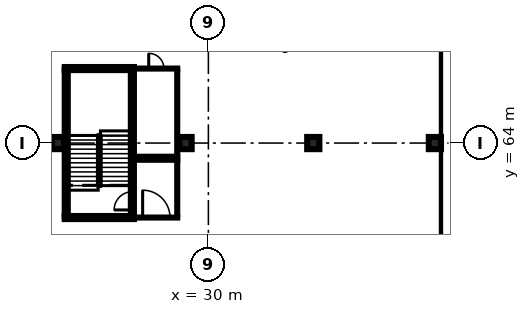
"""IFC4 building model, lengths in metres.
Left out: names, types, materials, properties, quantities, classifications, styles, units other than length and angle.
Written with IfcOpenShell. Run it as: python <this file> out.ifc"""

import sys

from ifc_helpers import new_model, si_unit, direction, frame, frame_2d, origin, origin_2d, place, context, subcontext, project, spatial, rectangle, extrude, element, fill, save


model = new_model("IFC4")
c1 = context("Model", 3, precision=1e-05, world=origin(), true_north=direction((0.0, 1.0)))
c2 = subcontext(c1, "Body", "Model", "MODEL_VIEW")
j1 = project(units=[si_unit("LENGTHUNIT", "METRE"), si_unit("PLANEANGLEUNIT", "RADIAN")], contexts=[c1])
p1 = place(None, origin())
s1 = spatial("IfcSite", under=j1, at=p1, CompositionType="ELEMENT")
p2 = place(p1, origin())
s2 = spatial("IfcBuilding", under=s1, at=p2, CompositionType="ELEMENT")
p3 = place(p2, frame((0.0, 0.0, -12.0)))
s3 = spatial("IfcBuildingStorey", under=s2, at=p3, CompositionType="ELEMENT", Elevation=-12.0)
p4 = place(p3, frame((45.75, -80.0, 0.0), z_axis=(0.0, 0.0, 1.0), x_axis=(0.0, 1.0, 0.0)))
e1 = element("IfcWall", 1, at=p4, inside=s3, PredefinedType="USERDEFINED", context=c2, shape_type="SweptSolid", body=[
    extrude(rectangle(XDim=160.0, YDim=0.9, at=frame_2d((80.0, 0.0))), origin(), (0.0, 0.0, 1.0), 11.55),
])
p5 = place(p2, frame((0.0, 0.0, -7.2)))
s4 = spatial("IfcBuildingStorey", under=s2, at=p5, CompositionType="ELEMENT", Elevation=-7.2)
for number, where, z_axis, x_axis in (
    (2, (20.1, 64.0, -0.4), (0.0, 0.0, 1.0), (1.0, 0.0, 0.0)),
    (3, (28.5, 64.0, -0.4), (0.0, 0.0, 1.0), (1.0, 0.0, 0.0)),
    (4, (36.9, 64.0, -0.4), (0.0, 0.0, 1.0), (1.0, 0.0, 0.0)),
    (5, (44.9, 64.0, -0.4), (0.0, 0.0, 1.0), (1.0, 0.0, 0.0)),
):
    element("IfcColumn", number, at=place(p5, frame(where, z_axis=z_axis, x_axis=x_axis)), inside=s4, PredefinedType="COLUMN", context=c2, shape_type="SweptSolid", body=[
        extrude(rectangle(XDim=0.8, YDim=0.8, at=origin_2d()), origin(), (0.0, 0.0, 1.0), 3.6),
    ])
p6 = place(p5, frame((25.1, 59.1, 0.0), z_axis=(0.0, 0.0, 1.0), x_axis=(1.0, 0.0, 0.0)))
e6 = element("IfcWall", 6, at=p6, inside=s4, PredefinedType="PARTITIONING", context=c2, shape_type="SweptSolid", body=[
    extrude(rectangle(XDim=2.95, YDim=0.2, at=frame_2d((1.475, 0.0))), origin(), (0.0, 0.0, 1.0), 3.2),
])
p7 = place(p6, frame((0.575, 0.0, 0.0)))
e7 = element("IfcOpeningElement", 7, at=p7, cuts=e6, PredefinedType="OPENING", context=c2, shape_type="SweptSolid", body=[
    extrude(rectangle(XDim=1.8, YDim=2.1, at=frame_2d((0.9, 1.05))), frame((0.0, 0.11, 0.0), z_axis=(0.0, -1.0, 0.0), x_axis=(1.0, 0.0, 0.0)), (0.0, 0.0, 1.0), 0.22),
])
p8 = place(p5, frame((25.1, 62.9, 0.0), z_axis=(0.0, 0.0, 1.0), x_axis=(1.0, 0.0, 0.0)))
e8 = element("IfcWall", 8, at=p8, inside=s4, PredefinedType="PARTITIONING", context=c2, shape_type="SweptSolid", body=[
    extrude(rectangle(XDim=2.95, YDim=0.2, at=frame_2d((1.475, 0.0))), origin(), (0.0, 0.0, 1.0), 3.2),
])
p9 = place(p5, frame((27.95, 59.2, 0.0), z_axis=(0.0, 0.0, 1.0), x_axis=(0.0, 1.0, 0.0)))
e9 = element("IfcWall", 9, at=p9, inside=s4, PredefinedType="PARTITIONING", context=c2, shape_type="SweptSolid", body=[
    extrude(rectangle(XDim=3.6, YDim=0.2, at=frame_2d((1.8, 0.0))), origin(), (0.0, 0.0, 1.0), 3.2),
])
p10 = place(p5, frame((25.1, 63.1, 0.0), z_axis=(0.0, 0.0, 1.0), x_axis=(1.0, 0.0, 0.0)))
e10 = element("IfcWall", 10, at=p10, inside=s4, PredefinedType="PARTITIONING", context=c2, shape_type="SweptSolid", body=[
    extrude(rectangle(XDim=2.95, YDim=0.2, at=frame_2d((1.475, 0.0))), origin(), (0.0, 0.0, 1.0), 3.2),
])
p11 = place(p5, frame((25.1, 68.9, 0.0), z_axis=(0.0, 0.0, 1.0), x_axis=(1.0, 0.0, 0.0)))
e11 = element("IfcWall", 11, at=p11, inside=s4, PredefinedType="PARTITIONING", context=c2, shape_type="SweptSolid", body=[
    extrude(rectangle(XDim=2.95, YDim=0.2, at=frame_2d((1.475, 0.0))), origin(), (0.0, 0.0, 1.0), 3.2),
])
p12 = place(p11, frame((0.975, 0.0, 0.0)))
e12 = element("IfcOpeningElement", 12, at=p12, cuts=e11, PredefinedType="OPENING", context=c2, shape_type="SweptSolid", body=[
    extrude(rectangle(XDim=1.0, YDim=2.1, at=frame_2d((0.5, 1.05))), frame((0.0, 0.11, 0.0), z_axis=(0.0, -1.0, 0.0), x_axis=(1.0, 0.0, 0.0)), (0.0, 0.0, 1.0), 0.22),
])
p13 = place(p5, frame((27.95, 63.2, 0.0), z_axis=(0.0, 0.0, 1.0), x_axis=(0.0, 1.0, 0.0)))
e13 = element("IfcWall", 13, at=p13, inside=s4, PredefinedType="PARTITIONING", context=c2, shape_type="SweptSolid", body=[
    extrude(rectangle(XDim=5.6, YDim=0.2, at=frame_2d((2.8, 0.0))), origin(), (0.0, 0.0, 1.0), 3.2),
])
p14 = place(p5, frame((20.65, 59.2, 0.0), z_axis=(0.0, 0.0, 1.0), x_axis=(0.0, 1.0, 0.0)))
e14 = element("IfcWall", 14, at=p14, inside=s4, PredefinedType="SOLIDWALL", context=c2, shape_type="SweptSolid", body=[
    extrude(rectangle(XDim=9.6, YDim=0.2, at=frame_2d((4.8, 0.0))), origin(), (0.0, 0.0, 1.0), 3.2),
])
p15 = place(p5, frame((25.0, 59.2, 0.0), z_axis=(0.0, 0.0, 1.0), x_axis=(0.0, 1.0, 0.0)))
e15 = element("IfcWall", 15, at=p15, inside=s4, PredefinedType="SOLIDWALL", context=c2, shape_type="SweptSolid", body=[
    extrude(rectangle(XDim=9.6, YDim=0.2, at=frame_2d((4.8, 0.0))), origin(), (0.0, 0.0, 1.0), 3.2),
])
p16 = place(p15, frame((0.4, 0.0, 0.0)))
e16 = element("IfcOpeningElement", 16, at=p16, cuts=e15, PredefinedType="OPENING", context=c2, shape_type="SweptSolid", body=[
    extrude(rectangle(XDim=1.2, YDim=2.1, at=frame_2d((0.6, 1.05))), frame((0.0, 0.11, 0.0), z_axis=(0.0, -1.0, 0.0), x_axis=(1.0, 0.0, 0.0)), (0.0, 0.0, 1.0), 0.22),
])
for number, where, z_axis, x_axis in (
    (17, (25.1, 59.1, 0.0), (0.0, 0.0, 1.0), (-1.0, 0.0, 0.0)),
    (18, (20.55, 68.9, 0.0), (0.0, 0.0, 1.0), (1.0, 0.0, 0.0)),
):
    element("IfcWall", number, at=place(p5, frame(where, z_axis=z_axis, x_axis=x_axis)), inside=s4, PredefinedType="SOLIDWALL", context=c2, shape_type="SweptSolid", body=[
        extrude(rectangle(XDim=4.55, YDim=0.2, at=frame_2d((2.275, 0.0))), origin(), (0.0, 0.0, 1.0), 3.2),
    ])
p17 = place(p7, origin())
e19 = element("IfcDoor", 19, at=p17, inside=s4, OperationType="DOUBLE_DOOR_SINGLE_SWING", PredefinedType="DOOR", context=c2, shape_type="SweptSolid", body=[
    extrude(rectangle(XDim=1.8, YDim=2.1, at=frame_2d((0.9, 1.05))), frame((0.0, 0.025, 0.0), z_axis=(0.0, -1.0, 0.0), x_axis=(1.0, 0.0, 0.0)), (0.0, 0.0, 1.0), 0.05),
])
fill(e7, e19)
p18 = place(p12, origin())
e20 = element("IfcDoor", 20, at=p18, inside=s4, OperationType="SINGLE_SWING_LEFT", PredefinedType="DOOR", context=c2, shape_type="SweptSolid", body=[
    extrude(rectangle(XDim=1.0, YDim=2.1, at=frame_2d((0.5, 1.05))), frame((0.0, 0.025, 0.0), z_axis=(0.0, -1.0, 0.0), x_axis=(1.0, 0.0, 0.0)), (0.0, 0.0, 1.0), 0.05),
])
fill(e12, e20)
p19 = place(p16, origin())
e21 = element("IfcDoor", 21, at=p19, inside=s4, OperationType="SINGLE_SWING_LEFT", PredefinedType="DOOR", context=c2, shape_type="SweptSolid", body=[
    extrude(rectangle(XDim=1.2, YDim=2.1, at=frame_2d((0.6, 1.05))), frame((0.0, 0.025, 0.0), z_axis=(0.0, -1.0, 0.0), x_axis=(1.0, 0.0, 0.0)), (0.0, 0.0, 1.0), 0.05),
])
fill(e16, e21)
save(model, sys.argv[1])
